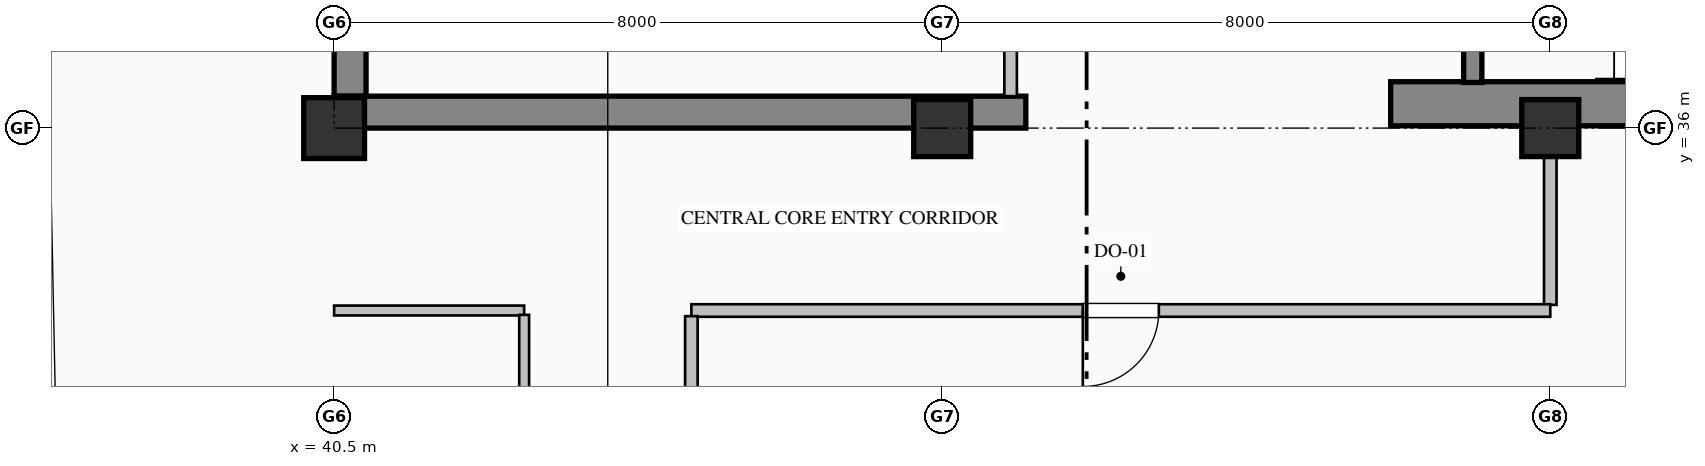
"""IFC4 building model, lengths in metres.
Left out: names, types, materials, properties, quantities, classifications, styles, units other than length and angle.
Written with IfcOpenShell. Run it as: python <this file> out.ifc"""

import sys

from ifc_helpers import new_model, si_unit, direction, frame, frame_2d, origin, origin_2d, place, context, subcontext, project, spatial, rectangle, hollow_rectangle, extrude, element, fill, save


model = new_model("IFC4")
c1 = context("Model", 3, precision=1e-05, world=origin(), true_north=direction((0.0, 1.0)))
c2 = subcontext(c1, "Body", "Model", "MODEL_VIEW")
j1 = project(units=[si_unit("LENGTHUNIT", "METRE"), si_unit("PLANEANGLEUNIT", "RADIAN")], contexts=[c1])
p1 = place(None, origin())
s1 = spatial("IfcSite", under=j1, at=p1, CompositionType="ELEMENT")
p2 = place(p1, origin())
s2 = spatial("IfcBuilding", under=s1, at=p2, CompositionType="ELEMENT")
p3 = place(p2, frame((0.0, 0.0, 355.2)))
s3 = spatial("IfcBuildingStorey", under=s2, at=p3, CompositionType="ELEMENT", Elevation=355.2)
p4 = place(p3, frame((40.71, 36.42, 0.0), z_axis=(0.0, 0.0, 1.0), x_axis=(0.0, 1.0, 0.0)))
e1 = element("IfcWall", 1, at=p4, inside=s3, PredefinedType="SHEAR", context=c2, shape_type="SweptSolid", body=[
    extrude(rectangle(XDim=7.98, YDim=0.42, at=frame_2d((3.99, 0.0))), origin(), (0.0, 0.0, 1.0), 3.785),
])
p5 = place(p3, frame((40.5, 36.21, 0.0), z_axis=(0.0, 0.0, 1.0), x_axis=(1.0, 0.0, 0.0)))
e2 = element("IfcWall", 2, at=p5, inside=s3, PredefinedType="SHEAR", context=c2, shape_type="SweptSolid", body=[
    extrude(rectangle(XDim=9.1, YDim=0.42, at=frame_2d((4.55, 0.0))), origin(), (0.0, 0.0, 1.0), 3.785),
])
p6 = place(p3, frame((54.4, 36.32, 0.0), z_axis=(0.0, 0.0, 1.0), x_axis=(1.0, 0.0, 0.0)))
e3 = element("IfcWall", 3, at=p6, inside=s3, PredefinedType="SHEAR", context=c2, shape_type="SweptSolid", body=[
    extrude(rectangle(XDim=9.6, YDim=0.58, at=frame_2d((4.8, 0.0))), origin(), (0.0, 0.0, 1.0), 4.0),
])
p7 = place(p3, frame((40.5, 36.0, 0.0), z_axis=(0.0, 0.0, 1.0), x_axis=(1.0, 0.0, 0.0)))
e4 = element("IfcColumn", 4, at=p7, inside=s3, PredefinedType="COLUMN", context=c2, shape_type="SweptSolid", body=[
    extrude(hollow_rectangle(XDim=0.8, YDim=0.8, WallThickness=0.032, at=origin_2d()), origin(), (0.0, 0.0, 1.0), 4.0),
])
for number, where, z_axis, x_axis in (
    (5, (48.5, 36.0, 0.0), (0.0, 0.0, 1.0), (1.0, 0.0, 0.0)),
    (6, (56.5, 36.0, 0.0), (0.0, 0.0, 1.0), (1.0, 0.0, 0.0)),
):
    element("IfcColumn", number, at=place(p3, frame(where, z_axis=z_axis, x_axis=x_axis)), inside=s3, PredefinedType="COLUMN", context=c2, shape_type="SweptSolid", body=[
        extrude(rectangle(XDim=0.75, YDim=0.75, at=origin_2d()), origin(), (0.0, 0.0, 1.0), 4.0),
    ])
p8 = place(p3, frame((55.48, 39.75, 0.0), z_axis=(0.0, 0.0, 1.0), x_axis=(0.0, -1.0, 0.0)))
e7 = element("IfcWall", 7, at=p8, inside=s3, PredefinedType="SOLIDWALL", context=c2, shape_type="SweptSolid", body=[
    extrude(rectangle(XDim=3.15, YDim=0.24, at=frame_2d((1.575, 0.0))), origin(), (0.0, 0.0, 1.0), 4.0),
])
p9 = place(p8, frame((1.0, 0.0, 0.0)))
e8 = element("IfcOpeningElement", 8, at=p9, cuts=e7, PredefinedType="OPENING", context=c2, shape_type="SweptSolid", body=[
    extrude(rectangle(XDim=1.15, YDim=2.2, at=frame_2d((0.575, 1.1))), frame((0.0, 0.13, 0.0), z_axis=(0.0, -1.0, 0.0), x_axis=(1.0, 0.0, 0.0)), (0.0, 0.0, 1.0), 0.26),
])
p10 = place(p3, frame((49.4, 36.42, 0.0), z_axis=(0.0, 0.0, 1.0), x_axis=(0.0, 1.0, 0.0)))
e9 = element("IfcWall", 9, at=p10, inside=s3, PredefinedType="PARTITIONING", context=c2, shape_type="SweptSolid", body=[
    extrude(rectangle(XDim=3.115, YDim=0.165, at=frame_2d((1.558, 0.0))), origin(), (0.0, 0.0, 1.0), 3.027),
])
p11 = place(p10, frame((1.058, 0.0, 0.0)))
e10 = element("IfcOpeningElement", 10, at=p11, cuts=e9, PredefinedType="OPENING", context=c2, shape_type="SweptSolid", body=[
    extrude(rectangle(XDim=1.0, YDim=2.15, at=frame_2d((0.5, 1.075))), frame((0.0, 0.093, 0.0), z_axis=(0.0, -1.0, 0.0), x_axis=(1.0, 0.0, 0.0)), (0.0, 0.0, 1.0), 0.185),
])
p12 = place(p3, frame((56.5, 36.0, 0.0), z_axis=(0.0, 0.0, 1.0), x_axis=(0.0, -1.0, 0.0)))
e11 = element("IfcWall", 11, at=p12, inside=s3, PredefinedType="PARTITIONING", context=c2, shape_type="SweptSolid", body=[
    extrude(rectangle(XDim=2.325, YDim=0.165, at=frame_2d((1.163, 0.0))), origin(), (0.0, 0.0, 1.0), 3.177),
])
p13 = place(p3, frame((56.5, 33.6, 0.0), z_axis=(0.0, 0.0, 1.0), x_axis=(-1.0, 0.0, 0.0)))
e12 = element("IfcWall", 12, at=p13, inside=s3, PredefinedType="PARTITIONING", context=c2, shape_type="SweptSolid", body=[
    extrude(rectangle(XDim=11.3, YDim=0.165, at=frame_2d((5.65, 0.0))), origin(), (0.0, 0.0, 1.0), 3.785),
])
p14 = place(p13, frame((5.15, 0.0, 0.0)))
e13 = element("IfcOpeningElement", 13, at=p14, cuts=e12, PredefinedType="OPENING", context=c2, shape_type="SweptSolid", body=[
    extrude(rectangle(XDim=1.0, YDim=2.15, at=frame_2d((0.5, 1.075))), frame((0.0, 0.093, 0.0), z_axis=(0.0, -1.0, 0.0), x_axis=(1.0, 0.0, 0.0)), (0.0, 0.0, 1.0), 0.185),
])
p15 = place(p3, frame((43.0, 33.6, 0.0), z_axis=(0.0, 0.0, 1.0), x_axis=(-1.0, 0.0, 0.0)))
e14 = element("IfcWall", 14, at=p15, inside=s3, PredefinedType="PARTITIONING", context=c2, shape_type="SweptSolid", body=[
    extrude(rectangle(XDim=2.5, YDim=0.13, at=frame_2d((1.25, 0.0))), origin(), (0.0, 0.0, 1.0), 3.785),
])
p16 = place(p3, frame((45.2, 33.525, 0.0), z_axis=(0.0, 0.0, 1.0), x_axis=(0.0, -1.0, 0.0)))
e15 = element("IfcWall", 15, at=p16, inside=s3, PredefinedType="PARTITIONING", context=c2, shape_type="SweptSolid", body=[
    extrude(rectangle(XDim=3.511, YDim=0.165, at=frame_2d((1.755, 0.0))), origin(), (0.0, 0.0, 1.0), 3.785),
])
p17 = place(p3, frame((43.0, 22.875, 0.0), z_axis=(0.0, 0.0, 1.0), x_axis=(0.0, 1.0, 0.0)))
e16 = element("IfcWall", 16, at=p17, inside=s3, PredefinedType="PARTITIONING", context=c2, shape_type="SweptSolid", body=[
    extrude(rectangle(XDim=10.668, YDim=0.13, at=frame_2d((5.334, 0.0))), origin(), (0.0, 0.0, 1.0), 3.785),
])
p18 = place(p17, frame((4.834, 0.0, 0.0)))
e17 = element("IfcOpeningElement", 17, at=p18, cuts=e16, PredefinedType="OPENING", context=c2, shape_type="SweptSolid", body=[
    extrude(rectangle(XDim=1.0, YDim=2.15, at=frame_2d((0.5, 1.075))), frame((0.0, 0.075, 0.0), z_axis=(0.0, -1.0, 0.0), x_axis=(1.0, 0.0, 0.0)), (0.0, 0.0, 1.0), 0.15),
])
p19 = place(p14, origin())
e18 = element("IfcDoor", 18, at=p19, inside=s3, OperationType="SINGLE_SWING_RIGHT", PredefinedType="DOOR", context=c2, shape_type="SweptSolid", body=[
    extrude(rectangle(XDim=1.0, YDim=2.15, at=frame_2d((0.5, 1.075))), frame((0.0, 0.025, 0.0), z_axis=(0.0, -1.0, 0.0), x_axis=(1.0, 0.0, 0.0)), (0.0, 0.0, 1.0), 0.05),
])
fill(e13, e18)
save(model, sys.argv[1])
